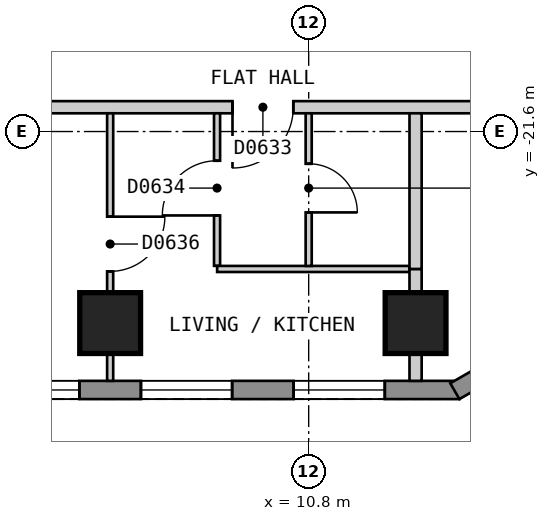
"""IFC4 building model, lengths in metres.
Left out: names, types, materials, properties, quantities, classifications, styles, units other than length and angle.
Written with IfcOpenShell. Run it as: python <this file> out.ifc"""

import sys

from ifc_helpers import new_model, si_unit, direction, frame, frame_2d, origin, origin_2d, place, context, subcontext, project, spatial, polyline, rectangle, outline, extrude, element, fill, save


model = new_model("IFC4")
c1 = context("Model", 3, precision=1e-05, world=origin(), true_north=direction((0.0, 1.0)))
c2 = subcontext(c1, "Body", "Model", "MODEL_VIEW")
j1 = project(units=[si_unit("LENGTHUNIT", "METRE"), si_unit("PLANEANGLEUNIT", "RADIAN")], contexts=[c1])
p1 = place(None, origin())
s1 = spatial("IfcSite", under=j1, at=p1, CompositionType="ELEMENT")
p2 = place(p1, origin())
s2 = spatial("IfcBuilding", under=s1, at=p2, CompositionType="ELEMENT")
p3 = place(p2, frame((0.0, 0.0, 75.0)))
s3 = spatial("IfcBuildingStorey", under=s2, at=p3, CompositionType="ELEMENT", Elevation=75.0)
for number, where, z_axis, x_axis in (
    (1, (7.535, -24.75, 0.0), (0.0, 0.0, 1.0), (1.0, 0.0, 0.0)),
    (2, (12.558, -24.75, 0.0), (0.0, 0.0, 1.0), (1.0, 0.0, 0.0)),
):
    element("IfcColumn", number, at=place(p3, frame(where, z_axis=z_axis, x_axis=x_axis)), inside=s3, PredefinedType="COLUMN", context=c2, shape_type="SweptSolid", body=[
        extrude(rectangle(XDim=1.0, YDim=1.0, at=origin_2d()), origin(), (0.0, 0.0, 1.0), 3.0),
    ])
p4 = place(p3, frame((-13.279, -25.85, 0.0), z_axis=(0.0, 0.0, 1.0), x_axis=(1.0, 0.0, 0.0)))
e3 = element("IfcWall", 3, at=p4, inside=s3, PredefinedType="SOLIDWALL", context=c2, shape_type="SweptSolid", body=[
    extrude(outline(polyline([(0.0, -0.15), (26.558, -0.15), (26.478, 0.15), (0.08, 0.15), (0.0, -0.15)])), origin(), (0.0, 0.0, 1.0), 2.7),
])
p5 = place(p4, frame((1.228, 0.0, 0.15)))
e4 = element("IfcOpeningElement", 4, at=p5, cuts=e3, PredefinedType="OPENING", context=c2, shape_type="SweptSolid", body=[
    extrude(rectangle(XDim=1.5, YDim=2.1, at=frame_2d((0.75, 1.05))), frame((0.0, 0.16, 0.0), z_axis=(0.0, -1.0, 0.0), x_axis=(1.0, 0.0, 0.0)), (0.0, 0.0, 1.0), 0.32),
])
p6 = place(p4, frame((3.739, 0.0, 0.15)))
e5 = element("IfcOpeningElement", 5, at=p6, cuts=e3, PredefinedType="OPENING", context=c2, shape_type="SweptSolid", body=[
    extrude(rectangle(XDim=1.5, YDim=2.1, at=frame_2d((0.75, 1.05))), frame((0.0, 0.16, 0.0), z_axis=(0.0, -1.0, 0.0), x_axis=(1.0, 0.0, 0.0)), (0.0, 0.0, 1.0), 0.32),
])
p7 = place(p4, frame((6.251, 0.0, 0.15)))
e6 = element("IfcOpeningElement", 6, at=p7, cuts=e3, PredefinedType="OPENING", context=c2, shape_type="SweptSolid", body=[
    extrude(rectangle(XDim=1.5, YDim=2.1, at=frame_2d((0.75, 1.05))), frame((0.0, 0.16, 0.0), z_axis=(0.0, -1.0, 0.0), x_axis=(1.0, 0.0, 0.0)), (0.0, 0.0, 1.0), 0.32),
])
p8 = place(p4, frame((8.762, 0.0, 0.15)))
e7 = element("IfcOpeningElement", 7, at=p8, cuts=e3, PredefinedType="OPENING", context=c2, shape_type="SweptSolid", body=[
    extrude(rectangle(XDim=1.5, YDim=2.1, at=frame_2d((0.75, 1.05))), frame((0.0, 0.16, 0.0), z_axis=(0.0, -1.0, 0.0), x_axis=(1.0, 0.0, 0.0)), (0.0, 0.0, 1.0), 0.32),
])
p9 = place(p4, frame((11.274, 0.0, 0.15)))
e8 = element("IfcOpeningElement", 8, at=p9, cuts=e3, PredefinedType="OPENING", context=c2, shape_type="SweptSolid", body=[
    extrude(rectangle(XDim=1.5, YDim=2.1, at=frame_2d((0.75, 1.05))), frame((0.0, 0.16, 0.0), z_axis=(0.0, -1.0, 0.0), x_axis=(1.0, 0.0, 0.0)), (0.0, 0.0, 1.0), 0.32),
])
p10 = place(p4, frame((13.785, 0.0, 0.15)))
e9 = element("IfcOpeningElement", 9, at=p10, cuts=e3, PredefinedType="OPENING", context=c2, shape_type="SweptSolid", body=[
    extrude(rectangle(XDim=1.5, YDim=2.1, at=frame_2d((0.75, 1.05))), frame((0.0, 0.16, 0.0), z_axis=(0.0, -1.0, 0.0), x_axis=(1.0, 0.0, 0.0)), (0.0, 0.0, 1.0), 0.32),
])
p11 = place(p4, frame((16.297, 0.0, 0.15)))
e10 = element("IfcOpeningElement", 10, at=p11, cuts=e3, PredefinedType="OPENING", context=c2, shape_type="SweptSolid", body=[
    extrude(rectangle(XDim=1.5, YDim=2.1, at=frame_2d((0.75, 1.05))), frame((0.0, 0.16, 0.0), z_axis=(0.0, -1.0, 0.0), x_axis=(1.0, 0.0, 0.0)), (0.0, 0.0, 1.0), 0.32),
])
p12 = place(p4, frame((18.808, 0.0, 0.15)))
e11 = element("IfcOpeningElement", 11, at=p12, cuts=e3, PredefinedType="OPENING", context=c2, shape_type="SweptSolid", body=[
    extrude(rectangle(XDim=1.5, YDim=2.1, at=frame_2d((0.75, 1.05))), frame((0.0, 0.16, 0.0), z_axis=(0.0, -1.0, 0.0), x_axis=(1.0, 0.0, 0.0)), (0.0, 0.0, 1.0), 0.32),
])
p13 = place(p4, frame((21.32, 0.0, 0.15)))
e12 = element("IfcOpeningElement", 12, at=p13, cuts=e3, PredefinedType="OPENING", context=c2, shape_type="SweptSolid", body=[
    extrude(rectangle(XDim=1.5, YDim=2.1, at=frame_2d((0.75, 1.05))), frame((0.0, 0.16, 0.0), z_axis=(0.0, -1.0, 0.0), x_axis=(1.0, 0.0, 0.0)), (0.0, 0.0, 1.0), 0.32),
])
p14 = place(p4, frame((23.831, 0.0, 0.15)))
e13 = element("IfcOpeningElement", 13, at=p14, cuts=e3, PredefinedType="OPENING", context=c2, shape_type="SweptSolid", body=[
    extrude(rectangle(XDim=1.5, YDim=2.1, at=frame_2d((0.75, 1.05))), frame((0.0, 0.16, 0.0), z_axis=(0.0, -1.0, 0.0), x_axis=(1.0, 0.0, 0.0)), (0.0, 0.0, 1.0), 0.32),
])
p15 = place(p3, frame((13.204, -25.87, 0.0), z_axis=(0.0, 0.0, 1.0), x_axis=(0.866010750942, 0.50002537861, 0.0)))
e14 = element("IfcWall", 14, at=p15, inside=s3, PredefinedType="SOLIDWALL", context=c2, shape_type="SweptSolid", body=[
    extrude(outline(polyline([(0.0, -0.15), (5.0, -0.15), (4.919, 0.15), (0.08, 0.15), (0.0, -0.15)])), origin(), (0.0, 0.0, 1.0), 2.7),
])
p16 = place(p15, frame((0.65, 0.0, 0.15)))
e15 = element("IfcOpeningElement", 15, at=p16, cuts=e14, PredefinedType="OPENING", context=c2, shape_type="SweptSolid", body=[
    extrude(rectangle(XDim=1.2, YDim=2.1, at=frame_2d((0.6, 1.05))), frame((0.0, 0.16, 0.0), z_axis=(0.0, -1.0, 0.0), x_axis=(1.0, 0.0, 0.0)), (0.0, 0.0, 1.0), 0.32),
])
p17 = place(p15, frame((3.149, 0.0, 0.15)))
e16 = element("IfcOpeningElement", 16, at=p17, cuts=e14, PredefinedType="OPENING", context=c2, shape_type="SweptSolid", body=[
    extrude(rectangle(XDim=1.2, YDim=2.1, at=frame_2d((0.6, 1.05))), frame((0.0, 0.16, 0.0), z_axis=(0.0, -1.0, 0.0), x_axis=(1.0, 0.0, 0.0)), (0.0, 0.0, 1.0), 0.32),
])
p18 = place(p3, frame((-15.499, -21.2, 0.0), z_axis=(0.0, 0.0, 1.0), x_axis=(1.0, 0.0, 0.0)))
e17 = element("IfcWall", 17, at=p18, inside=s3, PredefinedType="PARTITIONING", context=c2, shape_type="SweptSolid", body=[
    extrude(rectangle(XDim=30.898, YDim=0.2, at=frame_2d((15.449, 0.0))), origin(), (0.0, 0.0, 1.0), 2.7),
])
p19 = place(p18, frame((4.954, 0.0, 0.0)))
e18 = element("IfcOpeningElement", 18, at=p19, cuts=e17, PredefinedType="OPENING", context=c2, shape_type="SweptSolid", body=[
    extrude(rectangle(XDim=1.0, YDim=2.1, at=frame_2d((0.5, 1.05))), frame((0.0, 0.11, 0.0), z_axis=(0.0, -1.0, 0.0), x_axis=(1.0, 0.0, 0.0)), (0.0, 0.0, 1.0), 0.22),
])
p20 = place(p18, frame((25.046, 0.0, 0.0)))
e19 = element("IfcOpeningElement", 19, at=p20, cuts=e17, PredefinedType="OPENING", context=c2, shape_type="SweptSolid", body=[
    extrude(rectangle(XDim=1.0, YDim=2.1, at=frame_2d((0.5, 1.05))), frame((0.0, 0.11, 0.0), z_axis=(0.0, -1.0, 0.0), x_axis=(1.0, 0.0, 0.0)), (0.0, 0.0, 1.0), 0.22),
])
p21 = place(p3, frame((9.293, -21.3, 0.0), z_axis=(0.0, 0.0, 1.0), x_axis=(0.0, -1.0, 0.0)))
e20 = element("IfcWall", 20, at=p21, inside=s3, PredefinedType="PARTITIONING", context=c2, shape_type="SweptSolid", body=[
    extrude(rectangle(XDim=2.509, YDim=0.1, at=frame_2d((1.254, 0.0))), origin(), (0.0, 0.0, 1.0), 2.7),
])
p22 = place(p21, frame((0.78, 0.0, 0.0)))
e21 = element("IfcOpeningElement", 21, at=p22, cuts=e20, PredefinedType="OPENING", context=c2, shape_type="SweptSolid", body=[
    extrude(rectangle(XDim=0.9, YDim=2.1, at=frame_2d((0.45, 1.05))), frame((0.0, 0.06, 0.0), z_axis=(0.0, -1.0, 0.0), x_axis=(1.0, 0.0, 0.0)), (0.0, 0.0, 1.0), 0.12),
])
p23 = place(p3, frame((9.294, -23.86, 0.0), z_axis=(0.0, 0.0, 1.0), x_axis=(1.0, 0.0, 0.0)))
e22 = element("IfcWall", 22, at=p23, inside=s3, PredefinedType="PARTITIONING", context=c2, shape_type="SweptSolid", body=[
    extrude(rectangle(XDim=3.164, YDim=0.1, at=frame_2d((1.582, 0.0))), origin(), (0.0, 0.0, 1.0), 2.7),
])
p24 = place(p3, frame((7.535, -25.7, 0.0), z_axis=(0.0, 0.0, 1.0), x_axis=(0.0, 1.0, 0.0)))
e23 = element("IfcWall", 23, at=p24, inside=s3, PredefinedType="PARTITIONING", context=c2, shape_type="SweptSolid", body=[
    extrude(rectangle(XDim=4.4, YDim=0.1, at=frame_2d((2.2, 0.0))), origin(), (0.0, 0.0, 1.0), 2.7),
])
p25 = place(p24, frame((1.8, 0.0, 0.0)))
e24 = element("IfcOpeningElement", 24, at=p25, cuts=e23, PredefinedType="OPENING", context=c2, shape_type="SweptSolid", body=[
    extrude(rectangle(XDim=0.9, YDim=2.1, at=frame_2d((0.45, 1.05))), frame((0.0, 0.06, 0.0), z_axis=(0.0, -1.0, 0.0), x_axis=(1.0, 0.0, 0.0)), (0.0, 0.0, 1.0), 0.12),
])
p26 = place(p3, frame((10.8, -23.81, 0.0), z_axis=(0.0, 0.0, 1.0), x_axis=(0.0, 1.0, 0.0)))
e25 = element("IfcWall", 25, at=p26, inside=s3, PredefinedType="PARTITIONING", context=c2, shape_type="SweptSolid", body=[
    extrude(rectangle(XDim=2.51, YDim=0.1, at=frame_2d((1.255, 0.0))), origin(), (0.0, 0.0, 1.0), 2.7),
])
p27 = place(p26, frame((0.88, 0.0, 0.0)))
e26 = element("IfcOpeningElement", 26, at=p27, cuts=e25, PredefinedType="OPENING", context=c2, shape_type="SweptSolid", body=[
    extrude(rectangle(XDim=0.8, YDim=2.1, at=frame_2d((0.4, 1.05))), frame((0.0, 0.06, 0.0), z_axis=(0.0, -1.0, 0.0), x_axis=(1.0, 0.0, 0.0)), (0.0, 0.0, 1.0), 0.12),
])
p28 = place(p3, frame((12.558, -23.86, 0.0), z_axis=(0.0, 0.0, 1.0), x_axis=(0.0, -1.0, 0.0)))
e27 = element("IfcWall", 27, at=p28, inside=s3, PredefinedType="PARTITIONING", context=c2, shape_type="SweptSolid", body=[
    extrude(rectangle(XDim=1.84, YDim=0.2, at=frame_2d((0.92, 0.0))), origin(), (0.0, 0.0, 1.0), 2.7),
])
p29 = place(p3, frame((12.558, -23.86, 0.0), z_axis=(0.0, 0.0, 1.0), x_axis=(0.0, 1.0, 0.0)))
e28 = element("IfcWall", 28, at=p29, inside=s3, PredefinedType="PARTITIONING", context=c2, shape_type="SweptSolid", body=[
    extrude(rectangle(XDim=2.56, YDim=0.2, at=frame_2d((1.28, 0.0))), origin(), (0.0, 0.0, 1.0), 2.7),
])
p30 = place(p12, origin())
e29 = element("IfcWindow", 29, at=p30, inside=s3, PartitioningType="SINGLE_PANEL", PredefinedType="WINDOW", context=c2, shape_type="SweptSolid", body=[
    extrude(rectangle(XDim=1.5, YDim=2.1, at=frame_2d((0.75, 1.05))), frame((0.0, 0.03, 0.0), z_axis=(0.0, -1.0, 0.0), x_axis=(1.0, 0.0, 0.0)), (0.0, 0.0, 1.0), 0.06),
])
fill(e11, e29)
p31 = place(p13, origin())
e30 = element("IfcWindow", 30, at=p31, inside=s3, PartitioningType="SINGLE_PANEL", PredefinedType="WINDOW", context=c2, shape_type="SweptSolid", body=[
    extrude(rectangle(XDim=1.5, YDim=2.1, at=frame_2d((0.75, 1.05))), frame((0.0, 0.03, 0.0), z_axis=(0.0, -1.0, 0.0), x_axis=(1.0, 0.0, 0.0)), (0.0, 0.0, 1.0), 0.06),
])
fill(e12, e30)
p32 = place(p14, origin())
e31 = element("IfcWindow", 31, at=p32, inside=s3, PartitioningType="SINGLE_PANEL", PredefinedType="WINDOW", context=c2, shape_type="SweptSolid", body=[
    extrude(rectangle(XDim=1.5, YDim=2.1, at=frame_2d((0.75, 1.05))), frame((0.0, 0.03, 0.0), z_axis=(0.0, -1.0, 0.0), x_axis=(1.0, 0.0, 0.0)), (0.0, 0.0, 1.0), 0.06),
])
fill(e13, e31)
p33 = place(p20, origin())
e32 = element("IfcDoor", 32, at=p33, inside=s3, OperationType="SINGLE_SWING_LEFT", PredefinedType="DOOR", context=c2, shape_type="SweptSolid", body=[
    extrude(rectangle(XDim=1.0, YDim=2.1, at=frame_2d((0.5, 1.05))), frame((0.0, 0.025, 0.0), z_axis=(0.0, -1.0, 0.0), x_axis=(1.0, 0.0, 0.0)), (0.0, 0.0, 1.0), 0.05),
])
fill(e19, e32)
p34 = place(p22, origin())
e33 = element("IfcDoor", 33, at=p34, inside=s3, OperationType="SINGLE_SWING_RIGHT", PredefinedType="DOOR", context=c2, shape_type="SweptSolid", body=[
    extrude(rectangle(XDim=0.9, YDim=2.1, at=frame_2d((0.45, 1.05))), frame((0.0, 0.025, 0.0), z_axis=(0.0, -1.0, 0.0), x_axis=(1.0, 0.0, 0.0)), (0.0, 0.0, 1.0), 0.05),
])
fill(e21, e33)
p35 = place(p27, origin())
e34 = element("IfcDoor", 34, at=p35, inside=s3, OperationType="SINGLE_SWING_LEFT", PredefinedType="DOOR", context=c2, shape_type="SweptSolid", body=[
    extrude(rectangle(XDim=0.8, YDim=2.1, at=frame_2d((0.4, 1.05))), frame((0.0, 0.025, 0.0), z_axis=(0.0, -1.0, 0.0), x_axis=(1.0, 0.0, 0.0)), (0.0, 0.0, 1.0), 0.05),
])
fill(e26, e34)
p36 = place(p25, origin())
e35 = element("IfcDoor", 35, at=p36, inside=s3, OperationType="SINGLE_SWING_RIGHT", PredefinedType="DOOR", context=c2, shape_type="SweptSolid", body=[
    extrude(rectangle(XDim=0.9, YDim=2.1, at=frame_2d((0.45, 1.05))), frame((0.0, 0.025, 0.0), z_axis=(0.0, -1.0, 0.0), x_axis=(1.0, 0.0, 0.0)), (0.0, 0.0, 1.0), 0.05),
])
fill(e24, e35)
save(model, sys.argv[1])
